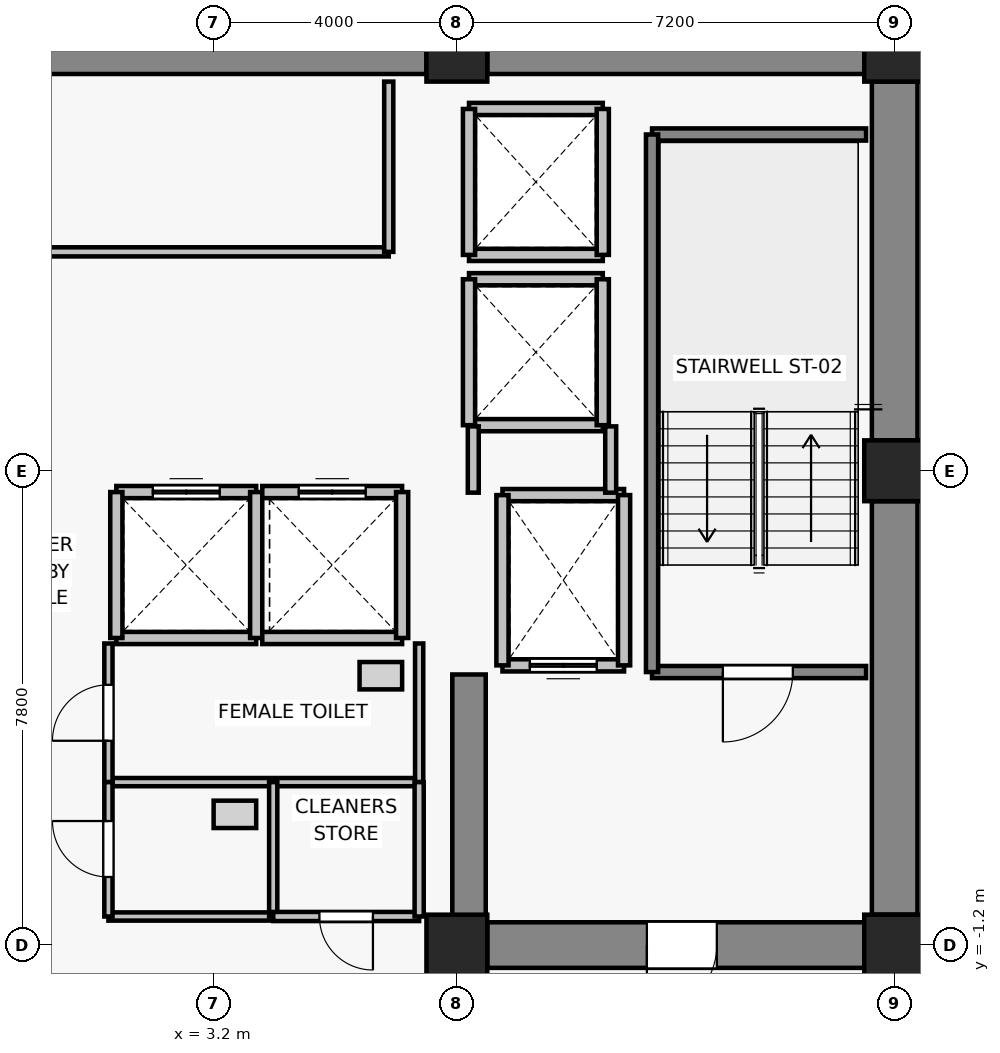
"""IFC4 building model, lengths in metres.
Left out: names, types, materials, properties, quantities, classifications, styles, units other than length and angle.
Written with IfcOpenShell. Run it as: python <this file> out.ifc"""

import sys

from ifc_helpers import new_model, si_unit, direction, frame, frame_2d, origin, origin_2d, place, context, subcontext, project, spatial, rectangle, extrude, source, transform, mapped, element, fill, save


model = new_model("IFC4")
c1 = context("Model", 3, precision=1e-05, world=origin(), true_north=direction((0.0, 1.0)))
c2 = subcontext(c1, "Body", "Model", "MODEL_VIEW")
j1 = project(units=[si_unit("LENGTHUNIT", "METRE"), si_unit("PLANEANGLEUNIT", "RADIAN")], contexts=[c1])
p1 = place(None, origin())
s1 = spatial("IfcSite", under=j1, at=p1, CompositionType="ELEMENT")
p2 = place(p1, origin())
s2 = spatial("IfcBuilding", under=s1, at=p2, CompositionType="ELEMENT")
p3 = place(p2, frame((0.0, 0.0, 129.7)))
s3 = spatial("IfcBuildingStorey", under=s2, at=p3, CompositionType="ELEMENT", Elevation=129.7)
for number, where, z_axis, x_axis in (
    (1, (7.2, -1.2, 0.0), (0.0, 0.0, 1.0), (1.0, 0.0, 0.0)),
    (2, (14.4, -1.2, 0.0), (0.0, 0.0, 1.0), (1.0, 0.0, 0.0)),
    (3, (14.4, 6.6, 0.0), (0.0, 0.0, 1.0), (1.0, 0.0, 0.0)),
    (4, (7.2, 13.5, 0.0), (0.0, 0.0, 1.0), (1.0, 0.0, 0.0)),
    (5, (14.4, 13.5, 0.0), (0.0, 0.0, 1.0), (1.0, 0.0, 0.0)),
):
    element("IfcColumn", number, at=place(p3, frame(where, z_axis=z_axis, x_axis=x_axis)), inside=s3, PredefinedType="COLUMN", context=c2, shape_type="SweptSolid", body=[
        extrude(rectangle(XDim=1.0, YDim=1.0, at=origin_2d()), origin(), (0.0, 0.0, 1.0), 3.3),
    ])
p4 = place(p3, frame((-6.7, 13.5, 0.0), z_axis=(0.0, 0.0, 1.0), x_axis=(1.0, 0.0, 0.0)))
e6 = element("IfcWall", 6, at=p4, inside=s3, PredefinedType="SHEAR", context=c2, shape_type="SweptSolid", body=[
    extrude(rectangle(XDim=13.4, YDim=0.75, at=frame_2d((6.7, 0.0))), origin(), (0.0, 0.0, 1.0), 3.075),
])
p5 = place(p3, frame((7.7, 13.5, 0.0), z_axis=(0.0, 0.0, 1.0), x_axis=(1.0, 0.0, 0.0)))
e7 = element("IfcWall", 7, at=p5, inside=s3, PredefinedType="SHEAR", context=c2, shape_type="SweptSolid", body=[
    extrude(rectangle(XDim=6.2, YDim=0.75, at=frame_2d((3.1, 0.0))), origin(), (0.0, 0.0, 1.0), 3.075),
])
p6 = place(p3, frame((14.4, -0.7, 0.0), z_axis=(0.0, 0.0, 1.0), x_axis=(0.0, 1.0, 0.0)))
e8 = element("IfcWall", 8, at=p6, inside=s3, PredefinedType="SHEAR", context=c2, shape_type="SweptSolid", body=[
    extrude(rectangle(XDim=6.8, YDim=0.75, at=frame_2d((3.4, 0.0))), origin(), (0.0, 0.0, 1.0), 3.075),
])
p7 = place(p3, frame((14.4, 7.1, 0.0), z_axis=(0.0, 0.0, 1.0), x_axis=(0.0, 1.0, 0.0)))
e9 = element("IfcWall", 9, at=p7, inside=s3, PredefinedType="SHEAR", context=c2, shape_type="SweptSolid", body=[
    extrude(rectangle(XDim=5.9, YDim=0.75, at=frame_2d((2.95, 0.0))), origin(), (0.0, 0.0, 1.0), 3.075),
])
p8 = place(p3, frame((13.9, -1.2, 0.0), z_axis=(0.0, 0.0, 1.0), x_axis=(-1.0, 0.0, 0.0)))
e10 = element("IfcWall", 10, at=p8, inside=s3, PredefinedType="SHEAR", context=c2, shape_type="SweptSolid", body=[
    extrude(rectangle(XDim=6.2, YDim=0.75, at=frame_2d((3.1, 0.0))), origin(), (0.0, 0.0, 1.0), 3.075),
])
p9 = place(p8, frame((2.425, 0.0, 0.0)))
e11 = element("IfcOpeningElement", 11, at=p9, cuts=e10, PredefinedType="OPENING", context=c2, shape_type="SweptSolid", body=[
    extrude(rectangle(XDim=1.15, YDim=2.15, at=frame_2d((0.575, 1.075))), frame((0.0, 0.385, 0.0), z_axis=(0.0, -1.0, 0.0), x_axis=(1.0, 0.0, 0.0)), (0.0, 0.0, 1.0), 0.77),
])
p10 = place(p3, frame((7.4, -0.825, 0.0), z_axis=(0.0, 0.0, 1.0), x_axis=(0.0, 1.0, 0.0)))
e12 = element("IfcWall", 12, at=p10, inside=s3, PredefinedType="SHEAR", context=c2, shape_type="SweptSolid", body=[
    extrude(rectangle(XDim=4.075, YDim=0.55, at=frame_2d((2.038, 0.0))), origin(), (0.0, 0.0, 1.0), 3.075),
])
p11 = place(p3, frame((9.95, 3.4, 0.0), z_axis=(0.0, 0.0, 1.0), x_axis=(-1.0, 0.0, 0.0)))
e13 = element("IfcWall", 13, at=p11, inside=s3, PredefinedType="SOLIDWALL", context=c2, shape_type="SweptSolid", body=[
    extrude(rectangle(XDim=2.0, YDim=0.2, at=frame_2d((1.0, 0.0))), origin(), (0.0, 0.0, 1.0), 3.075),
])
p12 = place(p11, frame((0.45, 0.0, 0.0)))
e14 = element("IfcOpeningElement", 14, at=p12, cuts=e13, PredefinedType="OPENING", context=c2, shape_type="SweptSolid", body=[
    extrude(rectangle(XDim=1.1, YDim=2.2, at=frame_2d((0.55, 1.1))), frame((0.0, 0.11, 0.0), z_axis=(0.0, -1.0, 0.0), x_axis=(1.0, 0.0, 0.0)), (0.0, 0.0, 1.0), 0.22),
])
p13 = place(p3, frame((7.95, 6.2, 0.0), z_axis=(0.0, 0.0, 1.0), x_axis=(1.0, 0.0, 0.0)))
e15 = element("IfcWall", 15, at=p13, inside=s3, PredefinedType="SOLIDWALL", context=c2, shape_type="SweptSolid", body=[
    extrude(rectangle(XDim=2.0, YDim=0.2, at=frame_2d((1.0, 0.0))), origin(), (0.0, 0.0, 1.0), 3.075),
])
for number, where, z_axis, x_axis in (
    (16, (7.95, 3.4, 0.0), (0.0, 0.0, 1.0), (0.0, 1.0, 0.0)),
    (17, (9.95, 6.2, 0.0), (0.0, 0.0, 1.0), (0.0, -1.0, 0.0)),
):
    element("IfcWall", number, at=place(p3, frame(where, z_axis=z_axis, x_axis=x_axis)), inside=s3, PredefinedType="SOLIDWALL", context=c2, shape_type="SweptSolid", body=[
        extrude(rectangle(XDim=2.8, YDim=0.2, at=frame_2d((1.4, 0.0))), origin(), (0.0, 0.0, 1.0), 3.075),
    ])
p14 = place(p3, frame((3.9, 3.85, 0.0), z_axis=(0.0, 0.0, 1.0), x_axis=(-1.0, 0.0, 0.0)))
e18 = element("IfcWall", 18, at=p14, inside=s3, PredefinedType="SOLIDWALL", context=c2, shape_type="SweptSolid", body=[
    extrude(rectangle(XDim=2.3, YDim=0.2, at=frame_2d((1.15, 0.0))), origin(), (0.0, 0.0, 1.0), 3.075),
])
p15 = place(p3, frame((1.6, 6.25, 0.0), z_axis=(0.0, 0.0, 1.0), x_axis=(1.0, 0.0, 0.0)))
e19 = element("IfcWall", 19, at=p15, inside=s3, PredefinedType="SOLIDWALL", context=c2, shape_type="SweptSolid", body=[
    extrude(rectangle(XDim=2.3, YDim=0.2, at=frame_2d((1.15, 0.0))), origin(), (0.0, 0.0, 1.0), 3.075),
])
p16 = place(p15, frame((0.6, 0.0, 0.0)))
e20 = element("IfcOpeningElement", 20, at=p16, cuts=e19, PredefinedType="OPENING", context=c2, shape_type="SweptSolid", body=[
    extrude(rectangle(XDim=1.1, YDim=2.2, at=frame_2d((0.55, 1.1))), frame((0.0, 0.11, 0.0), z_axis=(0.0, -1.0, 0.0), x_axis=(1.0, 0.0, 0.0)), (0.0, 0.0, 1.0), 0.22),
])
for number, where, z_axis, x_axis in (
    (21, (1.6, 3.85, 0.0), (0.0, 0.0, 1.0), (0.0, 1.0, 0.0)),
    (22, (3.9, 6.25, 0.0), (0.0, 0.0, 1.0), (0.0, -1.0, 0.0)),
):
    element("IfcWall", number, at=place(p3, frame(where, z_axis=z_axis, x_axis=x_axis)), inside=s3, PredefinedType="SOLIDWALL", context=c2, shape_type="SweptSolid", body=[
        extrude(rectangle(XDim=2.4, YDim=0.2, at=frame_2d((1.2, 0.0))), origin(), (0.0, 0.0, 1.0), 3.075),
    ])
p17 = place(p3, frame((6.3, 3.85, 0.0), z_axis=(0.0, 0.0, 1.0), x_axis=(-1.0, 0.0, 0.0)))
e23 = element("IfcWall", 23, at=p17, inside=s3, PredefinedType="SOLIDWALL", context=c2, shape_type="SweptSolid", body=[
    extrude(rectangle(XDim=2.3, YDim=0.2, at=frame_2d((1.15, 0.0))), origin(), (0.0, 0.0, 1.0), 3.075),
])
p18 = place(p3, frame((4.0, 6.25, 0.0), z_axis=(0.0, 0.0, 1.0), x_axis=(1.0, 0.0, 0.0)))
e24 = element("IfcWall", 24, at=p18, inside=s3, PredefinedType="SOLIDWALL", context=c2, shape_type="SweptSolid", body=[
    extrude(rectangle(XDim=2.3, YDim=0.2, at=frame_2d((1.15, 0.0))), origin(), (0.0, 0.0, 1.0), 3.075),
])
p19 = place(p18, frame((0.6, 0.0, 0.0)))
e25 = element("IfcOpeningElement", 25, at=p19, cuts=e24, PredefinedType="OPENING", context=c2, shape_type="SweptSolid", body=[
    extrude(rectangle(XDim=1.1, YDim=2.2, at=frame_2d((0.55, 1.1))), frame((0.0, 0.11, 0.0), z_axis=(0.0, -1.0, 0.0), x_axis=(1.0, 0.0, 0.0)), (0.0, 0.0, 1.0), 0.22),
])
p20 = place(p3, frame((6.3, 6.25, 0.0), z_axis=(0.0, 0.0, 1.0), x_axis=(0.0, -1.0, 0.0)))
e26 = element("IfcWall", 26, at=p20, inside=s3, PredefinedType="SOLIDWALL", context=c2, shape_type="SweptSolid", body=[
    extrude(rectangle(XDim=2.4, YDim=0.2, at=frame_2d((1.2, 0.0))), origin(), (0.0, 0.0, 1.0), 3.075),
])
for number, where, z_axis, x_axis in (
    (27, (9.6, 7.35, 0.0), (0.0, 0.0, 1.0), (-1.0, 0.0, 0.0)),
    (28, (7.4, 9.75, 0.0), (0.0, 0.0, 1.0), (1.0, 0.0, 0.0)),
):
    element("IfcWall", number, at=place(p3, frame(where, z_axis=z_axis, x_axis=x_axis)), inside=s3, PredefinedType="SOLIDWALL", context=c2, shape_type="SweptSolid", body=[
        extrude(rectangle(XDim=2.2, YDim=0.2, at=frame_2d((1.1, 0.0))), origin(), (0.0, 0.0, 1.0), 2.515),
    ])
p21 = place(p3, frame((7.4, 7.35, 0.0), z_axis=(0.0, 0.0, 1.0), x_axis=(0.0, 1.0, 0.0)))
e29 = element("IfcWall", 29, at=p21, inside=s3, PredefinedType="SOLIDWALL", context=c2, shape_type="SweptSolid", body=[
    extrude(rectangle(XDim=2.4, YDim=0.2, at=frame_2d((1.2, 0.0))), origin(), (0.0, 0.0, 1.0), 2.515),
])
p22 = place(p3, frame((9.6, 9.75, 0.0), z_axis=(0.0, 0.0, 1.0), x_axis=(0.0, -1.0, 0.0)))
e30 = element("IfcWall", 30, at=p22, inside=s3, PredefinedType="SOLIDWALL", context=c2, shape_type="SweptSolid", body=[
    extrude(rectangle(XDim=2.4, YDim=0.2, at=frame_2d((1.2, 0.0))), origin(), (0.0, 0.0, 1.0), 3.075),
])
for number, where, z_axis, x_axis in (
    (31, (9.6, 10.15, 0.0), (0.0, 0.0, 1.0), (-1.0, 0.0, 0.0)),
    (32, (7.4, 12.55, 0.0), (0.0, 0.0, 1.0), (1.0, 0.0, 0.0)),
):
    element("IfcWall", number, at=place(p3, frame(where, z_axis=z_axis, x_axis=x_axis)), inside=s3, PredefinedType="SOLIDWALL", context=c2, shape_type="SweptSolid", body=[
        extrude(rectangle(XDim=2.2, YDim=0.2, at=frame_2d((1.1, 0.0))), origin(), (0.0, 0.0, 1.0), 2.515),
    ])
p23 = place(p3, frame((7.4, 10.15, 0.0), z_axis=(0.0, 0.0, 1.0), x_axis=(0.0, 1.0, 0.0)))
e33 = element("IfcWall", 33, at=p23, inside=s3, PredefinedType="SOLIDWALL", context=c2, shape_type="SweptSolid", body=[
    extrude(rectangle(XDim=2.4, YDim=0.2, at=frame_2d((1.2, 0.0))), origin(), (0.0, 0.0, 1.0), 2.515),
])
p24 = place(p3, frame((9.6, 12.55, 0.0), z_axis=(0.0, 0.0, 1.0), x_axis=(0.0, -1.0, 0.0)))
e34 = element("IfcWall", 34, at=p24, inside=s3, PredefinedType="SOLIDWALL", context=c2, shape_type="SweptSolid", body=[
    extrude(rectangle(XDim=2.4, YDim=0.2, at=frame_2d((1.2, 0.0))), origin(), (0.0, 0.0, 1.0), 3.075),
])
p25 = place(p3, frame((13.93, 3.29, 0.0), z_axis=(0.0, 0.0, 1.0), x_axis=(-1.0, 0.0, 0.0)))
e35 = element("IfcWall", 35, at=p25, inside=s3, PredefinedType="SOLIDWALL", context=c2, shape_type="SweptSolid", body=[
    extrude(rectangle(XDim=3.52, YDim=0.2, at=frame_2d((1.76, 0.0))), origin(), (0.0, 0.0, 1.0), 3.075),
])
p26 = place(p25, frame((1.205, 0.0, 0.0)))
e36 = element("IfcOpeningElement", 36, at=p26, cuts=e35, PredefinedType="OPENING", context=c2, shape_type="SweptSolid", body=[
    extrude(rectangle(XDim=1.15, YDim=2.15, at=frame_2d((0.575, 1.075))), frame((0.0, 0.11, 0.0), z_axis=(0.0, -1.0, 0.0), x_axis=(1.0, 0.0, 0.0)), (0.0, 0.0, 1.0), 0.22),
])
p27 = place(p3, frame((10.41, 12.13, 0.0), z_axis=(0.0, 0.0, 1.0), x_axis=(1.0, 0.0, 0.0)))
e37 = element("IfcWall", 37, at=p27, inside=s3, PredefinedType="SOLIDWALL", context=c2, shape_type="SweptSolid", body=[
    extrude(rectangle(XDim=3.52, YDim=0.2, at=frame_2d((1.76, 0.0))), origin(), (0.0, 0.0, 1.0), 3.075),
])
p28 = place(p3, frame((10.41, 3.29, 0.0), z_axis=(0.0, 0.0, 1.0), x_axis=(0.0, 1.0, 0.0)))
e38 = element("IfcWall", 38, at=p28, inside=s3, PredefinedType="SOLIDWALL", context=c2, shape_type="SweptSolid", body=[
    extrude(rectangle(XDim=8.84, YDim=0.2, at=frame_2d((4.42, 0.0))), origin(), (0.0, 0.0, 1.0), 3.075),
])
p29 = place(p3, frame((7.47, 6.24, 0.0), z_axis=(0.0, 0.0, 1.0), x_axis=(0.0, 1.0, 0.0)))
e39 = element("IfcWall", 39, at=p29, inside=s3, PredefinedType="PARTITIONING", context=c2, shape_type="SweptSolid", body=[
    extrude(rectangle(XDim=1.09, YDim=0.18, at=frame_2d((0.545, 0.0))), origin(), (0.0, 0.0, 1.0), 2.515),
])
p30 = place(p3, frame((9.73, 7.33, 0.0), z_axis=(0.0, 0.0, 1.0), x_axis=(0.0, -1.0, 0.0)))
e40 = element("IfcWall", 40, at=p30, inside=s3, PredefinedType="PARTITIONING", context=c2, shape_type="SweptSolid", body=[
    extrude(rectangle(XDim=1.09, YDim=0.18, at=frame_2d((0.545, 0.0))), origin(), (0.0, 0.0, 1.0), 3.075),
])
p31 = place(p3, frame((6.08, 10.2, 0.0), z_axis=(0.0, 0.0, 1.0), x_axis=(-1.0, 0.0, 0.0)))
e41 = element("IfcWall", 41, at=p31, inside=s3, PredefinedType="PARTITIONING", context=c2, shape_type="SweptSolid", body=[
    extrude(rectangle(XDim=12.16, YDim=0.15, at=frame_2d((6.08, 0.0))), origin(), (0.0, 0.0, 1.0), 3.075),
])
p32 = place(p31, frame((7.005, 0.0, 0.0)))
e42 = element("IfcOpeningElement", 42, at=p32, cuts=e41, PredefinedType="OPENING", context=c2, shape_type="SweptSolid", body=[
    extrude(rectangle(XDim=1.15, YDim=2.15, at=frame_2d((0.575, 1.075))), frame((0.0, 0.085, 0.0), z_axis=(0.0, -1.0, 0.0), x_axis=(1.0, 0.0, 0.0)), (0.0, 0.0, 1.0), 0.17),
])
p33 = place(p3, frame((6.08, 13.0, 0.0), z_axis=(0.0, 0.0, 1.0), x_axis=(0.0, -1.0, 0.0)))
e43 = element("IfcWall", 43, at=p33, inside=s3, PredefinedType="PARTITIONING", context=c2, shape_type="SweptSolid", body=[
    extrude(rectangle(XDim=2.8, YDim=0.15, at=frame_2d((1.4, 0.0))), origin(), (0.0, 0.0, 1.0), 3.075),
])
p34 = place(p3, frame((6.58, 1.48, 0.0), z_axis=(0.0, 0.0, 1.0), x_axis=(-1.0, 0.0, 0.0)))
e44 = element("IfcWall", 44, at=p34, inside=s3, PredefinedType="PARTITIONING", context=c2, shape_type="SweptSolid", body=[
    extrude(rectangle(XDim=5.11, YDim=0.135, at=frame_2d((2.555, 0.0))), origin(), (0.0, 0.0, 1.0), 3.075),
])
p35 = place(p3, frame((1.47, 1.48, 0.0), z_axis=(0.0, 0.0, 1.0), x_axis=(0.0, 1.0, 0.0)))
e45 = element("IfcWall", 45, at=p35, inside=s3, PredefinedType="PARTITIONING", context=c2, shape_type="SweptSolid", body=[
    extrude(rectangle(XDim=2.28, YDim=0.135, at=frame_2d((1.14, 0.0))), origin(), (0.0, 0.0, 1.0), 3.075),
])
p36 = place(p35, frame((0.68, 0.0, 0.0)))
e46 = element("IfcOpeningElement", 46, at=p36, cuts=e45, PredefinedType="OPENING", context=c2, shape_type="SweptSolid", body=[
    extrude(rectangle(XDim=0.92, YDim=2.1, at=frame_2d((0.46, 1.05))), frame((0.0, 0.077, 0.0), z_axis=(0.0, -1.0, 0.0), x_axis=(1.0, 0.0, 0.0)), (0.0, 0.0, 1.0), 0.155),
])
p37 = place(p3, frame((6.58, 3.76, 0.0), z_axis=(0.0, 0.0, 1.0), x_axis=(0.0, -1.0, 0.0)))
e47 = element("IfcWall", 47, at=p37, inside=s3, PredefinedType="PARTITIONING", context=c2, shape_type="SweptSolid", body=[
    extrude(rectangle(XDim=2.28, YDim=0.135, at=frame_2d((1.14, 0.0))), origin(), (0.0, 0.0, 1.0), 3.075),
])
p38 = place(p3, frame((4.18, -0.73, 0.0), z_axis=(0.0, 0.0, 1.0), x_axis=(-1.0, 0.0, 0.0)))
e48 = element("IfcWall", 48, at=p38, inside=s3, PredefinedType="PARTITIONING", context=c2, shape_type="SweptSolid", body=[
    extrude(rectangle(XDim=2.71, YDim=0.135, at=frame_2d((1.355, 0.0))), origin(), (0.0, 0.0, 1.0), 3.075),
])
p39 = place(p3, frame((1.47, -0.73, 0.0), z_axis=(0.0, 0.0, 1.0), x_axis=(0.0, 1.0, 0.0)))
e49 = element("IfcWall", 49, at=p39, inside=s3, PredefinedType="PARTITIONING", context=c2, shape_type="SweptSolid", body=[
    extrude(rectangle(XDim=2.21, YDim=0.135, at=frame_2d((1.105, 0.0))), origin(), (0.0, 0.0, 1.0), 3.075),
])
p40 = place(p39, frame((0.65, 0.0, 0.0)))
e50 = element("IfcOpeningElement", 50, at=p40, cuts=e49, PredefinedType="OPENING", context=c2, shape_type="SweptSolid", body=[
    extrude(rectangle(XDim=0.92, YDim=2.1, at=frame_2d((0.46, 1.05))), frame((0.0, 0.077, 0.0), z_axis=(0.0, -1.0, 0.0), x_axis=(1.0, 0.0, 0.0)), (0.0, 0.0, 1.0), 0.155),
])
p41 = place(p3, frame((4.18, 1.48, 0.0), z_axis=(0.0, 0.0, 1.0), x_axis=(0.0, -1.0, 0.0)))
e51 = element("IfcWall", 51, at=p41, inside=s3, PredefinedType="PARTITIONING", context=c2, shape_type="SweptSolid", body=[
    extrude(rectangle(XDim=2.21, YDim=0.135, at=frame_2d((1.105, 0.0))), origin(), (0.0, 0.0, 1.0), 3.075),
])
p42 = place(p3, frame((6.58, -0.73, 0.0), z_axis=(0.0, 0.0, 1.0), x_axis=(-1.0, 0.0, 0.0)))
e52 = element("IfcWall", 52, at=p42, inside=s3, PredefinedType="PARTITIONING", context=c2, shape_type="SweptSolid", body=[
    extrude(rectangle(XDim=2.4, YDim=0.15, at=frame_2d((1.2, 0.0))), origin(), (0.0, 0.0, 1.0), 3.075),
])
p43 = place(p42, frame((0.76, 0.0, 0.0)))
e53 = element("IfcOpeningElement", 53, at=p43, cuts=e52, PredefinedType="OPENING", context=c2, shape_type="SweptSolid", body=[
    extrude(rectangle(XDim=0.88, YDim=2.1, at=frame_2d((0.44, 1.05))), frame((0.0, 0.085, 0.0), z_axis=(0.0, -1.0, 0.0), x_axis=(1.0, 0.0, 0.0)), (0.0, 0.0, 1.0), 0.17),
])
p44 = place(p3, frame((6.58, 1.48, 0.0), z_axis=(0.0, 0.0, 1.0), x_axis=(0.0, -1.0, 0.0)))
e54 = element("IfcWall", 54, at=p44, inside=s3, PredefinedType="PARTITIONING", context=c2, shape_type="SweptSolid", body=[
    extrude(rectangle(XDim=2.21, YDim=0.15, at=frame_2d((1.105, 0.0))), origin(), (0.0, 0.0, 1.0), 3.075),
])
m1 = source(origin(), c2, "Body", "SweptSolid", [
    extrude(rectangle(XDim=1.1, YDim=2.2, at=frame_2d((0.55, 1.1))), frame((0.0, 0.025, 0.0), z_axis=(0.0, -1.0, 0.0), x_axis=(1.0, 0.0, 0.0)), (0.0, 0.0, 1.0), 0.05),
])
p45 = place(p12, origin())
e55 = element("IfcDoor", 55, at=p45, inside=s3, OperationType="DOUBLE_DOOR_SLIDING", PredefinedType="DOOR", context=c2, shape_type="MappedRepresentation", body=[
    mapped(m1, transform((0.0, 0.0, 0.0), x_axis=(1.0, 0.0, 0.0), y_axis=(0.0, 1.0, 0.0), z_axis=(0.0, 0.0, 1.0), scale=1.0)),
])
fill(e14, e55)
p46 = place(p16, origin())
e56 = element("IfcDoor", 56, at=p46, inside=s3, OperationType="DOUBLE_DOOR_SLIDING", PredefinedType="DOOR", context=c2, shape_type="MappedRepresentation", body=[
    mapped(m1, transform((0.0, 0.0, 0.0), x_axis=(1.0, 0.0, 0.0), y_axis=(0.0, 1.0, 0.0), z_axis=(0.0, 0.0, 1.0), scale=1.0)),
])
fill(e20, e56)
p47 = place(p19, origin())
e57 = element("IfcDoor", 57, at=p47, inside=s3, OperationType="DOUBLE_DOOR_SLIDING", PredefinedType="DOOR", context=c2, shape_type="MappedRepresentation", body=[
    mapped(m1, transform((0.0, 0.0, 0.0), x_axis=(1.0, 0.0, 0.0), y_axis=(0.0, 1.0, 0.0), z_axis=(0.0, 0.0, 1.0), scale=1.0)),
])
fill(e25, e57)
m2 = source(origin(), c2, "Body", "SweptSolid", [
    extrude(rectangle(XDim=1.15, YDim=2.15, at=frame_2d((0.575, 1.075))), frame((0.0, 0.025, 0.0), z_axis=(0.0, -1.0, 0.0), x_axis=(1.0, 0.0, 0.0)), (0.0, 0.0, 1.0), 0.05),
])
p48 = place(p26, origin())
e58 = element("IfcDoor", 58, at=p48, inside=s3, OperationType="SINGLE_SWING_RIGHT", PredefinedType="DOOR", context=c2, shape_type="MappedRepresentation", body=[
    mapped(m2, transform((0.0, 0.0, 0.0), x_axis=(1.0, 0.0, 0.0), y_axis=(0.0, 1.0, 0.0), z_axis=(0.0, 0.0, 1.0), scale=1.0)),
])
fill(e36, e58)
p49 = place(p9, origin())
e59 = element("IfcDoor", 59, at=p49, inside=s3, OperationType="SINGLE_SWING_RIGHT", PredefinedType="DOOR", context=c2, shape_type="MappedRepresentation", body=[
    mapped(m2, transform((0.0, 0.0, 0.0), x_axis=(1.0, 0.0, 0.0), y_axis=(0.0, 1.0, 0.0), z_axis=(0.0, 0.0, 1.0), scale=1.0)),
])
fill(e11, e59)
m3 = source(origin(), c2, "Body", "SweptSolid", [
    extrude(rectangle(XDim=0.92, YDim=2.1, at=frame_2d((0.46, 1.05))), frame((0.0, 0.025, 0.0), z_axis=(0.0, -1.0, 0.0), x_axis=(1.0, 0.0, 0.0)), (0.0, 0.0, 1.0), 0.05),
])
p50 = place(p36, origin())
e60 = element("IfcDoor", 60, at=p50, inside=s3, OperationType="SINGLE_SWING_LEFT", PredefinedType="DOOR", context=c2, shape_type="MappedRepresentation", body=[
    mapped(m3, transform((0.0, 0.0, 0.0), x_axis=(1.0, 0.0, 0.0), y_axis=(0.0, 1.0, 0.0), z_axis=(0.0, 0.0, 1.0), scale=1.0)),
])
fill(e46, e60)
p51 = place(p40, origin())
e61 = element("IfcDoor", 61, at=p51, inside=s3, OperationType="SINGLE_SWING_RIGHT", PredefinedType="DOOR", context=c2, shape_type="MappedRepresentation", body=[
    mapped(m3, transform((0.0, 0.0, 0.0), x_axis=(1.0, 0.0, 0.0), y_axis=(0.0, 1.0, 0.0), z_axis=(0.0, 0.0, 1.0), scale=1.0)),
])
fill(e50, e61)
m4 = source(origin(), c2, "Body", "SweptSolid", [
    extrude(rectangle(XDim=0.88, YDim=2.1, at=frame_2d((0.44, 1.05))), frame((0.0, 0.025, 0.0), z_axis=(0.0, -1.0, 0.0), x_axis=(1.0, 0.0, 0.0)), (0.0, 0.0, 1.0), 0.05),
])
p52 = place(p43, origin())
e62 = element("IfcDoor", 62, at=p52, inside=s3, OperationType="SINGLE_SWING_LEFT", PredefinedType="DOOR", context=c2, shape_type="MappedRepresentation", body=[
    mapped(m4, transform((0.0, 0.0, 0.0), x_axis=(1.0, 0.0, 0.0), y_axis=(0.0, 1.0, 0.0), z_axis=(0.0, 0.0, 1.0), scale=1.0)),
])
fill(e53, e62)
save(model, sys.argv[1])
